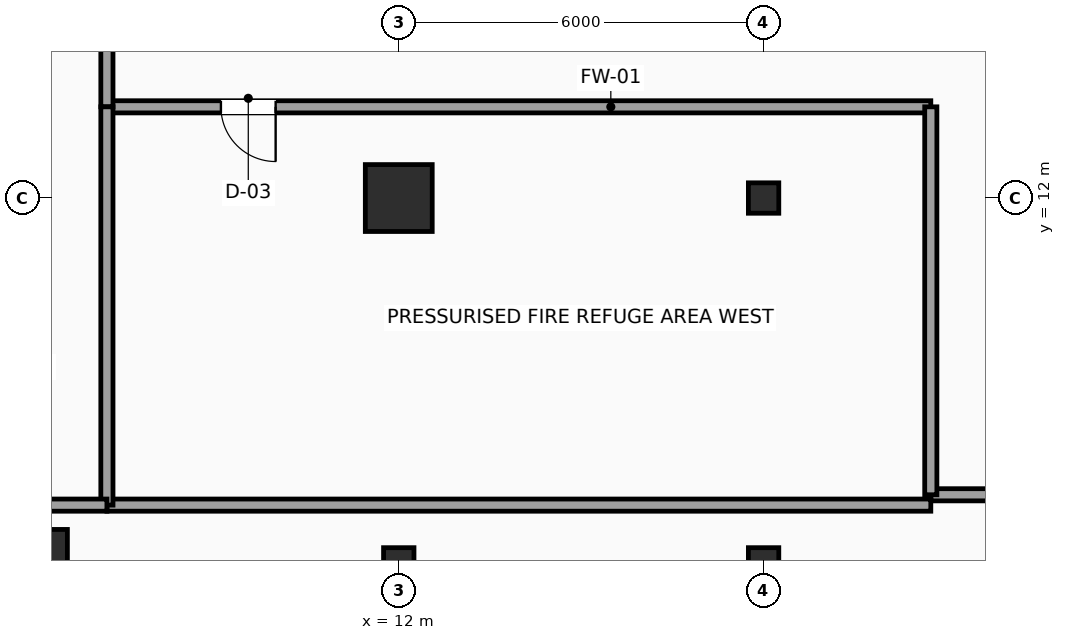
"""IFC4 building model, lengths in metres.
Left out: names, types, materials, properties, quantities, classifications, styles, units other than length and angle.
Written with IfcOpenShell. Run it as: python <this file> out.ifc"""

import sys

from ifc_helpers import new_model, si_unit, direction, frame, frame_2d, origin, origin_2d, place, context, subcontext, project, spatial, rectangle, hollow_rectangle, extrude, element, fill, save


model = new_model("IFC4")
c1 = context("Model", 3, precision=1e-05, world=origin(), true_north=direction((0.0, 1.0)))
c2 = subcontext(c1, "Body", "Model", "MODEL_VIEW")
j1 = project(units=[si_unit("LENGTHUNIT", "METRE"), si_unit("PLANEANGLEUNIT", "RADIAN")], contexts=[c1])
p1 = place(None, origin())
s1 = spatial("IfcSite", under=j1, at=p1, CompositionType="ELEMENT")
p2 = place(p1, origin())
s2 = spatial("IfcBuilding", under=s1, at=p2, CompositionType="ELEMENT")
p3 = place(p2, frame((0.0, 0.0, 164.4)))
s3 = spatial("IfcBuildingStorey", under=s2, at=p3, CompositionType="ELEMENT", Elevation=164.4)
p4 = place(p3, frame((6.0, 6.0, 0.0), z_axis=(0.0, 0.0, 1.0), x_axis=(1.0, 0.0, 0.0)))
e1 = element("IfcColumn", 1, at=p4, inside=s3, PredefinedType="COLUMN", context=c2, shape_type="SweptSolid", body=[
    extrude(rectangle(XDim=1.1, YDim=1.1, at=origin_2d()), origin(), (0.0, 0.0, 1.0), 4.8),
])
p5 = place(p3, frame((12.0, 6.0, 0.0), z_axis=(0.0, 0.0, 1.0), x_axis=(1.0, 0.0, 0.0)))
e2 = element("IfcColumn", 2, at=p5, inside=s3, PredefinedType="COLUMN", context=c2, shape_type="SweptSolid", body=[
    extrude(hollow_rectangle(XDim=0.5, YDim=0.5, WallThickness=0.025, InnerFilletRadius=0.025, OuterFilletRadius=0.04, at=origin_2d()), origin(), (0.0, 0.0, 1.0), 4.8),
])
p6 = place(p3, frame((12.0, 12.0, 0.0), z_axis=(0.0, 0.0, 1.0), x_axis=(1.0, 0.0, 0.0)))
e3 = element("IfcColumn", 3, at=p6, inside=s3, PredefinedType="COLUMN", context=c2, shape_type="SweptSolid", body=[
    extrude(rectangle(XDim=1.1, YDim=1.1, at=origin_2d()), origin(), (0.0, 0.0, 1.0), 4.8),
])
for number, where, z_axis, x_axis in (
    (4, (18.0, 6.0, 0.0), (0.0, 0.0, 1.0), (1.0, 0.0, 0.0)),
    (5, (18.0, 12.0, 0.0), (0.0, 0.0, 1.0), (1.0, 0.0, 0.0)),
):
    element("IfcColumn", number, at=place(p3, frame(where, z_axis=z_axis, x_axis=x_axis)), inside=s3, PredefinedType="COLUMN", context=c2, shape_type="SweptSolid", body=[
        extrude(hollow_rectangle(XDim=0.5, YDim=0.5, WallThickness=0.025, InnerFilletRadius=0.025, OuterFilletRadius=0.04, at=origin_2d()), origin(), (0.0, 0.0, 1.0), 4.8),
    ])
p7 = place(p3, frame((20.75, 13.5, 0.0), z_axis=(0.0, 0.0, 1.0), x_axis=(-1.0, 0.0, 0.0)))
e6 = element("IfcWall", 6, at=p7, inside=s3, PredefinedType="SOLIDWALL", context=c2, shape_type="SweptSolid", body=[
    extrude(rectangle(XDim=13.55, YDim=0.2, at=frame_2d((6.775, 0.0))), origin(), (0.0, 0.0, 1.0), 4.59),
])
p8 = place(p7, frame((10.775, 0.0, 0.0)))
e7 = element("IfcOpeningElement", 7, at=p8, cuts=e6, PredefinedType="OPENING", context=c2, shape_type="SweptSolid", body=[
    extrude(rectangle(XDim=0.9, YDim=2.15, at=frame_2d((0.45, 1.075))), frame((0.0, 0.11, 0.0), z_axis=(0.0, -1.0, 0.0), x_axis=(1.0, 0.0, 0.0)), (0.0, 0.0, 1.0), 0.22),
])
p9 = place(p3, frame((7.2, 13.5, 0.0), z_axis=(0.0, 0.0, 1.0), x_axis=(0.0, 1.0, 0.0)))
e8 = element("IfcWall", 8, at=p9, inside=s3, PredefinedType="SOLIDWALL", context=c2, shape_type="SweptSolid", body=[
    extrude(rectangle(XDim=2.95, YDim=0.2, at=frame_2d((1.475, 0.0))), origin(), (0.0, 0.0, 1.0), 4.59),
])
p10 = place(p9, frame((0.975, 0.0, 0.0)))
e9 = element("IfcOpeningElement", 9, at=p10, cuts=e8, PredefinedType="OPENING", context=c2, shape_type="SweptSolid", body=[
    extrude(rectangle(XDim=0.9, YDim=2.15, at=frame_2d((0.45, 1.075))), frame((0.0, 0.11, 0.0), z_axis=(0.0, -1.0, 0.0), x_axis=(1.0, 0.0, 0.0)), (0.0, 0.0, 1.0), 0.22),
])
p11 = place(p3, frame((23.98, 7.12, 0.0), z_axis=(0.0, 0.0, 1.0), x_axis=(-1.0, 0.0, 0.0)))
e10 = element("IfcWall", 10, at=p11, inside=s3, PredefinedType="SOLIDWALL", context=c2, shape_type="SweptSolid", body=[
    extrude(rectangle(XDim=3.23, YDim=0.2, at=frame_2d((1.615, 0.0))), origin(), (0.0, 0.0, 1.0), 4.59),
])
p12 = place(p3, frame((20.75, 7.12, 0.0), z_axis=(0.0, 0.0, 1.0), x_axis=(0.0, 1.0, 0.0)))
e11 = element("IfcWall", 11, at=p12, inside=s3, PredefinedType="SOLIDWALL", context=c2, shape_type="SweptSolid", body=[
    extrude(rectangle(XDim=6.38, YDim=0.2, at=frame_2d((3.19, 0.0))), origin(), (0.0, 0.0, 1.0), 4.59),
])
p13 = place(p3, frame((7.2, 6.95, 0.0), z_axis=(0.0, 0.0, 1.0), x_axis=(1.0, 0.0, 0.0)))
e12 = element("IfcWall", 12, at=p13, inside=s3, PredefinedType="SOLIDWALL", context=c2, shape_type="SweptSolid", body=[
    extrude(rectangle(XDim=13.55, YDim=0.2, at=frame_2d((6.775, 0.0))), origin(), (0.0, 0.0, 1.0), 4.59),
])
p14 = place(p3, frame((7.2, 6.95, 0.0), z_axis=(0.0, 0.0, 1.0), x_axis=(0.0, 1.0, 0.0)))
e13 = element("IfcWall", 13, at=p14, inside=s3, PredefinedType="SOLIDWALL", context=c2, shape_type="SweptSolid", body=[
    extrude(rectangle(XDim=6.55, YDim=0.2, at=frame_2d((3.275, 0.0))), origin(), (0.0, 0.0, 1.0), 4.59),
])
p15 = place(p3, frame((1.75, 6.95, 0.0), z_axis=(0.0, 0.0, 1.0), x_axis=(1.0, 0.0, 0.0)))
e14 = element("IfcWall", 14, at=p15, inside=s3, PredefinedType="SOLIDWALL", context=c2, shape_type="SweptSolid", body=[
    extrude(rectangle(XDim=5.45, YDim=0.2, at=frame_2d((2.725, 0.0))), origin(), (0.0, 0.0, 1.0), 4.59),
])
p16 = place(p8, origin())
e15 = element("IfcDoor", 15, at=p16, inside=s3, OperationType="SINGLE_SWING_LEFT", PredefinedType="DOOR", context=c2, shape_type="SweptSolid", body=[
    extrude(rectangle(XDim=0.9, YDim=2.15, at=frame_2d((0.45, 1.075))), frame((0.0, 0.025, 0.0), z_axis=(0.0, -1.0, 0.0), x_axis=(1.0, 0.0, 0.0)), (0.0, 0.0, 1.0), 0.05),
])
fill(e7, e15)
save(model, sys.argv[1])
